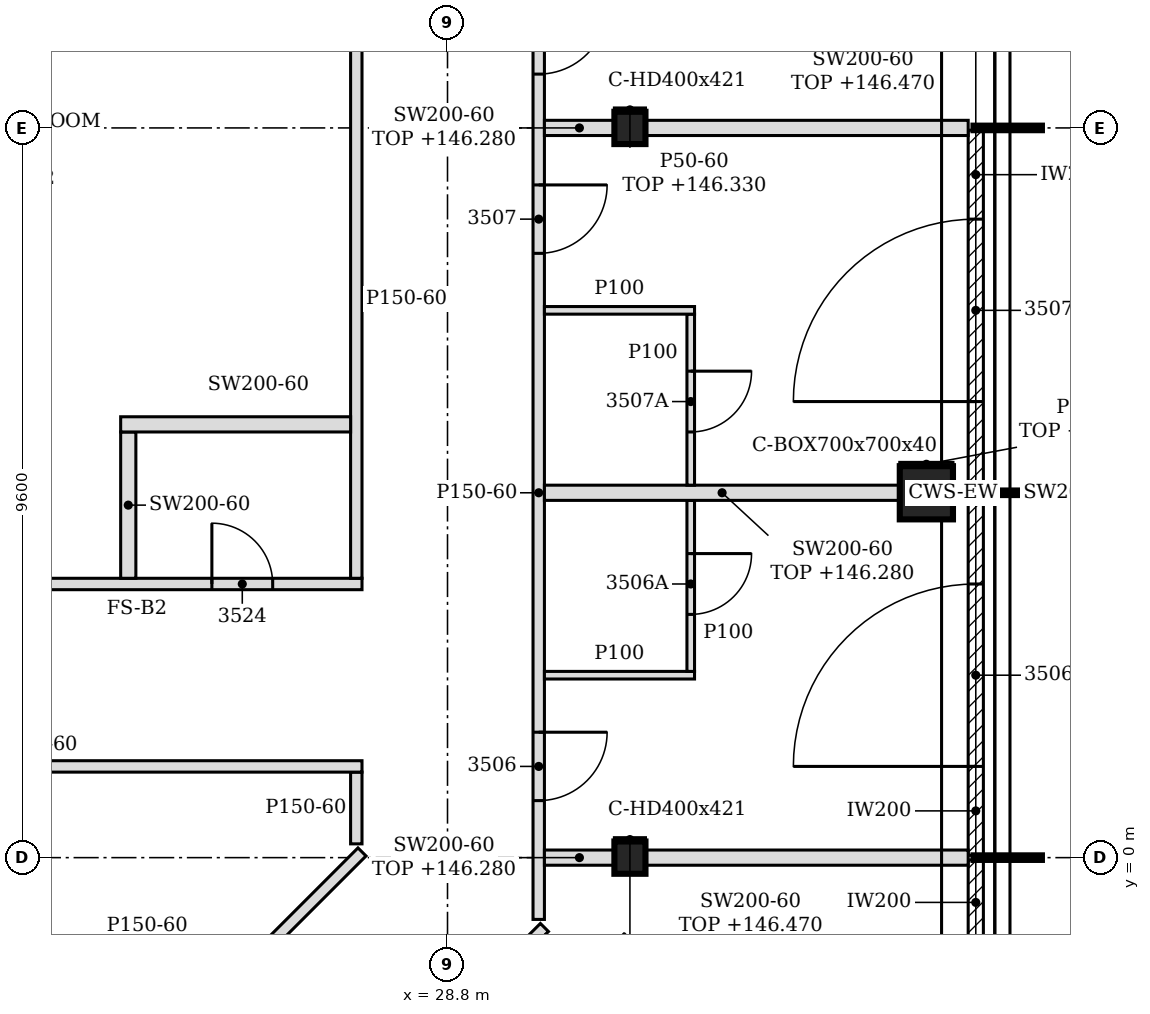
"""IFC4 building model, lengths in metres.
Left out: names, types, materials, properties, quantities, classifications, styles, units other than length and angle.
Written with IfcOpenShell. Run it as: python <this file> out.ifc"""

import sys

from ifc_helpers import new_model, si_unit, direction, frame, frame_2d, origin, origin_2d, place, context, subcontext, project, spatial, polyline, rectangle, hollow_rectangle, i_section, outline, extrude, element, fill, save


model = new_model("IFC4")
c1 = context("Model", 3, precision=1e-05, world=origin(), true_north=direction((0.0, 1.0)))
c2 = subcontext(c1, "Body", "Model", "MODEL_VIEW")
j1 = project(units=[si_unit("LENGTHUNIT", "METRE"), si_unit("PLANEANGLEUNIT", "RADIAN")], contexts=[c1])
p1 = place(None, origin())
s1 = spatial("IfcSite", under=j1, at=p1, CompositionType="ELEMENT")
p2 = place(p1, origin())
s2 = spatial("IfcBuilding", under=s1, at=p2, CompositionType="ELEMENT")
p3 = place(p2, frame((0.0, 0.0, 143.4)))
s3 = spatial("IfcBuildingStorey", under=s2, at=p3, CompositionType="ELEMENT", Elevation=143.4)
p4 = place(p3, frame((35.1, 4.8, -0.15), z_axis=(0.0, 0.0, 1.0), x_axis=(1.0, 0.0, 0.0)))
e1 = element("IfcColumn", 1, at=p4, inside=s3, PredefinedType="COLUMN", context=c2, shape_type="SweptSolid", body=[
    extrude(hollow_rectangle(XDim=0.7, YDim=0.7, WallThickness=0.04, at=origin_2d()), origin(), (0.0, 0.0, 1.0), 3.6),
])
for number, where, z_axis, x_axis in (
    (2, (31.2, 0.0, -0.15), (0.0, 0.0, 1.0), (1.0, 0.0, 0.0)),
    (3, (31.2, 9.6, -0.15), (0.0, 0.0, 1.0), (1.0, 0.0, 0.0)),
):
    element("IfcColumn", number, at=place(p3, frame(where, z_axis=z_axis, x_axis=x_axis)), inside=s3, PredefinedType="COLUMN", context=c2, shape_type="SweptSolid", body=[
        extrude(i_section(OverallWidth=0.409, OverallDepth=0.425, WebThickness=0.033, FlangeThickness=0.052, FilletRadius=0.015, at=origin_2d()), origin(), (0.0, 0.0, 1.0), 3.6),
    ])
p5 = place(p3, frame((35.75, -4.656, 0.0), z_axis=(0.0, 0.0, 1.0), x_axis=(0.0, 1.0, 0.0)))
e4 = element("IfcWall", 4, at=p5, inside=s3, PredefinedType="NOTDEFINED", context=c2, shape_type="SweptSolid", body=[
    extrude(rectangle(XDim=4.626, YDim=0.2, at=frame_2d((2.313, 0.0))), origin(), (0.0, 0.0, 1.0), 3.45),
])
p6 = place(p5, frame((1.108, 0.0, 0.0)))
e5 = element("IfcOpeningElement", 5, at=p6, cuts=e4, PredefinedType="OPENING", context=c2, shape_type="SweptSolid", body=[
    extrude(rectangle(XDim=2.4, YDim=2.4, at=frame_2d((1.2, 1.2))), frame((0.0, 0.11, 0.0), z_axis=(0.0, -1.0, 0.0), x_axis=(1.0, 0.0, 0.0)), (0.0, 0.0, 1.0), 0.22),
])
p7 = place(p3, frame((35.75, 0.03, 0.0), z_axis=(0.0, 0.0, 1.0), x_axis=(0.0, 1.0, 0.0)))
e6 = element("IfcWall", 6, at=p7, inside=s3, PredefinedType="NOTDEFINED", context=c2, shape_type="SweptSolid", body=[
    extrude(rectangle(XDim=4.74, YDim=0.2, at=frame_2d((2.37, 0.0))), origin(), (0.0, 0.0, 1.0), 3.45),
])
p8 = place(p7, frame((1.17, 0.0, 0.0)))
e7 = element("IfcOpeningElement", 7, at=p8, cuts=e6, PredefinedType="OPENING", context=c2, shape_type="SweptSolid", body=[
    extrude(rectangle(XDim=2.4, YDim=2.4, at=frame_2d((1.2, 1.2))), frame((0.0, 0.11, 0.0), z_axis=(0.0, -1.0, 0.0), x_axis=(1.0, 0.0, 0.0)), (0.0, 0.0, 1.0), 0.22),
])
p9 = place(p3, frame((35.75, 4.83, 0.0), z_axis=(0.0, 0.0, 1.0), x_axis=(0.0, 1.0, 0.0)))
e8 = element("IfcWall", 8, at=p9, inside=s3, PredefinedType="NOTDEFINED", context=c2, shape_type="SweptSolid", body=[
    extrude(rectangle(XDim=4.74, YDim=0.2, at=frame_2d((2.37, 0.0))), origin(), (0.0, 0.0, 1.0), 3.45),
])
p10 = place(p9, frame((1.17, 0.0, 0.0)))
e9 = element("IfcOpeningElement", 9, at=p10, cuts=e8, PredefinedType="OPENING", context=c2, shape_type="SweptSolid", body=[
    extrude(rectangle(XDim=2.4, YDim=2.4, at=frame_2d((1.2, 1.2))), frame((0.0, 0.11, 0.0), z_axis=(0.0, -1.0, 0.0), x_axis=(1.0, 0.0, 0.0)), (0.0, 0.0, 1.0), 0.22),
])
p11 = place(p3, frame((22.722, -8.272, 0.0), z_axis=(0.0, 0.0, 1.0), x_axis=(0.707106781187, 0.707106781187, 0.0)))
e10 = element("IfcWall", 10, at=p11, inside=s3, PredefinedType="PARTITIONING", context=c2, shape_type="SweptSolid", body=[
    extrude(rectangle(XDim=10.399, YDim=0.15, at=frame_2d((5.199, 0.0))), origin(), (0.0, 0.0, 1.0), 2.88),
])
p12 = place(p11, frame((1.925, 0.0, 0.0)))
e11 = element("IfcOpeningElement", 11, at=p12, cuts=e10, PredefinedType="OPENING", context=c2, shape_type="SweptSolid", body=[
    extrude(rectangle(XDim=0.9, YDim=2.1, at=frame_2d((0.45, 1.05))), frame((0.0, 0.085, 0.0), z_axis=(0.0, -1.0, 0.0), x_axis=(1.0, 0.0, 0.0)), (0.0, 0.0, 1.0), 0.17),
])
p13 = place(p11, frame((5.963, 0.0, 0.0)))
e12 = element("IfcOpeningElement", 12, at=p13, cuts=e10, PredefinedType="OPENING", context=c2, shape_type="SweptSolid", body=[
    extrude(rectangle(XDim=0.9, YDim=2.1, at=frame_2d((0.45, 1.05))), frame((0.0, 0.085, 0.0), z_axis=(0.0, -1.0, 0.0), x_axis=(1.0, 0.0, 0.0)), (0.0, 0.0, 1.0), 0.17),
])
p14 = place(p3, frame((19.408, -8.191, 0.0), z_axis=(0.0, 0.0, 1.0), x_axis=(0.707117222888, 0.707096339331, 0.0)))
e13 = element("IfcWall", 13, at=p14, inside=s3, PredefinedType="PARTITIONING", context=c2, shape_type="SweptSolid", body=[
    extrude(rectangle(XDim=11.691, YDim=0.15, at=frame_2d((5.845, 0.0))), origin(), (0.0, 0.0, 1.0), 2.88),
])
p15 = place(p14, frame((5.195, 0.0, 0.0)))
e14 = element("IfcOpeningElement", 14, at=p15, cuts=e13, PredefinedType="OPENING", context=c2, shape_type="SweptSolid", body=[
    extrude(rectangle(XDim=0.9, YDim=2.1, at=frame_2d((0.45, 1.05))), frame((0.0, 0.085, 0.0), z_axis=(0.0, -1.0, 0.0), x_axis=(1.0, 0.0, 0.0)), (0.0, 0.0, 1.0), 0.17),
])
p16 = place(p3, frame((30.0, -0.813, 0.0), z_axis=(0.0, 0.0, 1.0), x_axis=(0.0, 1.0, 0.0)))
e15 = element("IfcWall", 15, at=p16, inside=s3, PredefinedType="PARTITIONING", context=c2, shape_type="SweptSolid", body=[
    extrude(outline(polyline([(0.0, 0.0), (12.834, 0.0), (12.834, 3.45), (10.518, 3.45), (10.516, 2.88), (10.308, 2.88), (10.306, 3.45), (5.718, 3.45), (5.716, 2.88), (5.508, 2.88), (5.506, 3.45), (0.918, 3.45), (0.916, 2.88), (0.708, 2.88), (0.706, 3.45), (0.0, 3.45), (0.0, 0.0)])), frame((0.0, 0.075, 0.0), z_axis=(0.0, -1.0, 0.0), x_axis=(1.0, 0.0, 0.0)), (0.0, 0.0, 1.0), 0.15),
])
p17 = place(p16, frame((1.563, 0.0, 0.0)))
e16 = element("IfcOpeningElement", 16, at=p17, cuts=e15, PredefinedType="OPENING", context=c2, shape_type="SweptSolid", body=[
    extrude(rectangle(XDim=0.9, YDim=2.1, at=frame_2d((0.45, 1.05))), frame((0.0, 0.085, 0.0), z_axis=(0.0, -1.0, 0.0), x_axis=(1.0, 0.0, 0.0)), (0.0, 0.0, 1.0), 0.17),
])
p18 = place(p16, frame((8.763, 0.0, 0.0)))
e17 = element("IfcOpeningElement", 17, at=p18, cuts=e15, PredefinedType="OPENING", context=c2, shape_type="SweptSolid", body=[
    extrude(rectangle(XDim=0.9, YDim=2.1, at=frame_2d((0.45, 1.05))), frame((0.0, 0.085, 0.0), z_axis=(0.0, -1.0, 0.0), x_axis=(1.0, 0.0, 0.0)), (0.0, 0.0, 1.0), 0.17),
])
p19 = place(p16, frame((11.121, 0.0, 0.0)))
e18 = element("IfcOpeningElement", 18, at=p19, cuts=e15, PredefinedType="OPENING", context=c2, shape_type="SweptSolid", body=[
    extrude(rectangle(XDim=0.9, YDim=2.1, at=frame_2d((0.45, 1.05))), frame((0.0, 0.085, 0.0), z_axis=(0.0, -1.0, 0.0), x_axis=(1.0, 0.0, 0.0)), (0.0, 0.0, 1.0), 0.17),
])
p20 = place(p3, frame((30.075, 0.0, 0.0), z_axis=(0.0, 0.0, 1.0), x_axis=(1.0, 0.0, 0.0)))
e19 = element("IfcWall", 19, at=p20, inside=s3, PredefinedType="PARTITIONING", context=c2, shape_type="SweptSolid", body=[
    extrude(rectangle(XDim=0.921, YDim=0.2, at=frame_2d((0.46, 0.0))), origin(), (0.0, 0.0, 1.0), 2.88),
])
p21 = place(p3, frame((31.405, 0.0, 0.0), z_axis=(0.0, 0.0, 1.0), x_axis=(1.0, 0.0, 0.0)))
e20 = element("IfcWall", 20, at=p21, inside=s3, PredefinedType="PARTITIONING", context=c2, shape_type="SweptSolid", body=[
    extrude(outline(polyline([(0.0, 0.0), (4.245, 0.0), (4.246, 3.07), (3.845, 3.07), (3.844, 2.93), (3.545, 2.93), (3.543, 3.07), (0.0, 3.07), (0.0, 0.0)])), frame((0.0, 0.1, 0.0), z_axis=(0.0, -1.0, 0.0), x_axis=(1.0, 0.0, 0.0)), (0.0, 0.0, 1.0), 0.2),
])
p22 = place(p3, frame((27.6, 0.181, 0.0), z_axis=(0.0, 0.0, 1.0), x_axis=(0.0, 1.0, 0.0)))
e21 = element("IfcWall", 21, at=p22, inside=s3, PredefinedType="PARTITIONING", context=c2, shape_type="SweptSolid", body=[
    extrude(rectangle(XDim=0.944, YDim=0.15, at=frame_2d((0.472, 0.0))), origin(), (0.0, 0.0, 1.0), 3.45),
])
p23 = place(p3, frame((19.125, 1.2, 0.0), z_axis=(0.0, 0.0, 1.0), x_axis=(1.0, 0.0, 0.0)))
e22 = element("IfcWall", 22, at=p23, inside=s3, PredefinedType="PARTITIONING", context=c2, shape_type="SweptSolid", body=[
    extrude(outline(polyline([(0.0, 0.0), (8.55, 0.0), (8.55, 3.45), (0.225, 3.45), (0.223, 2.83), (0.0, 2.83), (0.0, 0.0)])), frame((0.0, 0.075, 0.0), z_axis=(0.0, -1.0, 0.0), x_axis=(1.0, 0.0, 0.0)), (0.0, 0.0, 1.0), 0.15),
])
p24 = place(p3, frame((30.075, 2.4, 0.0), z_axis=(0.0, 0.0, 1.0), x_axis=(1.0, 0.0, 0.0)))
e23 = element("IfcWall", 23, at=p24, inside=s3, PredefinedType="PARTITIONING", context=c2, shape_type="SweptSolid", body=[
    extrude(outline(polyline([(0.0, 0.0), (1.975, 0.0), (1.975, 3.45), (1.275, 3.45), (1.273, 2.93), (0.975, 2.93), (0.973, 3.45), (0.0, 3.45), (0.0, 0.0)])), frame((0.0, 0.05, 0.0), z_axis=(0.0, -1.0, 0.0), x_axis=(1.0, 0.0, 0.0)), (0.0, 0.0, 1.0), 0.1),
])
p25 = place(p3, frame((32.0, 2.45, 0.0), z_axis=(0.0, 0.0, 1.0), x_axis=(0.0, 1.0, 0.0)))
e24 = element("IfcWall", 24, at=p25, inside=s3, PredefinedType="PARTITIONING", context=c2, shape_type="SweptSolid", body=[
    extrude(rectangle(XDim=2.25, YDim=0.1, at=frame_2d((1.125, 0.0))), origin(), (0.0, 0.0, 1.0), 3.45),
])
p26 = place(p25, frame((0.75, 0.0, 0.0)))
e25 = element("IfcOpeningElement", 25, at=p26, cuts=e24, PredefinedType="OPENING", context=c2, shape_type="SweptSolid", body=[
    extrude(rectangle(XDim=0.8, YDim=2.1, at=frame_2d((0.4, 1.05))), frame((0.0, 0.06, 0.0), z_axis=(0.0, -1.0, 0.0), x_axis=(1.0, 0.0, 0.0)), (0.0, 0.0, 1.0), 0.12),
])
p27 = place(p3, frame((19.125, 3.6, 0.0), z_axis=(0.0, 0.0, 1.0), x_axis=(1.0, 0.0, 0.0)))
e26 = element("IfcWall", 26, at=p27, inside=s3, PredefinedType="PARTITIONING", context=c2, shape_type="SweptSolid", body=[
    extrude(outline(polyline([(0.0, 0.0), (8.55, 0.0), (8.55, 3.45), (0.225, 3.45), (0.223, 2.83), (0.0, 2.83), (0.0, 0.0)])), frame((0.0, 0.075, 0.0), z_axis=(0.0, -1.0, 0.0), x_axis=(1.0, 0.0, 0.0)), (0.0, 0.0, 1.0), 0.15),
])
p28 = place(p27, frame((6.575, 0.0, 0.0)))
e27 = element("IfcOpeningElement", 27, at=p28, cuts=e26, PredefinedType="OPENING", context=c2, shape_type="SweptSolid", body=[
    extrude(rectangle(XDim=0.8, YDim=2.1, at=frame_2d((0.4, 1.05))), frame((0.0, 0.085, 0.0), z_axis=(0.0, -1.0, 0.0), x_axis=(1.0, 0.0, 0.0)), (0.0, 0.0, 1.0), 0.17),
])
p29 = place(p3, frame((24.6, 3.675, 0.0), z_axis=(0.0, 0.0, 1.0), x_axis=(0.0, 1.0, 0.0)))
e28 = element("IfcWall", 28, at=p29, inside=s3, PredefinedType="PARTITIONING", context=c2, shape_type="SweptSolid", body=[
    extrude(outline(polyline([(0.0, 0.0), (1.925, 0.0), (1.925, 3.45), (1.23, 3.45), (1.228, 2.88), (1.02, 2.88), (1.018, 3.45), (0.0, 3.45), (0.0, 0.0)])), frame((0.0, 0.1, 0.0), z_axis=(0.0, -1.0, 0.0), x_axis=(1.0, 0.0, 0.0)), (0.0, 0.0, 1.0), 0.2),
])
p30 = place(p3, frame((27.6, 3.675, 0.0), z_axis=(0.0, 0.0, 1.0), x_axis=(0.0, 1.0, 0.0)))
e29 = element("IfcWall", 29, at=p30, inside=s3, PredefinedType="PARTITIONING", context=c2, shape_type="SweptSolid", body=[
    extrude(outline(polyline([(0.0, 0.0), (7.352, 0.0), (7.352, 3.45), (6.03, 3.45), (6.028, 2.88), (5.82, 2.88), (5.818, 3.45), (1.23, 3.45), (1.228, 2.88), (1.02, 2.88), (1.018, 3.45), (0.0, 3.45), (0.0, 0.0)])), frame((0.0, 0.075, 0.0), z_axis=(0.0, -1.0, 0.0), x_axis=(1.0, 0.0, 0.0)), (0.0, 0.0, 1.0), 0.15),
])
p31 = place(p3, frame((30.075, 4.8, 0.0), z_axis=(0.0, 0.0, 1.0), x_axis=(1.0, 0.0, 0.0)))
e30 = element("IfcWall", 30, at=p31, inside=s3, PredefinedType="PARTITIONING", context=c2, shape_type="SweptSolid", body=[
    extrude(rectangle(XDim=4.675, YDim=0.2, at=frame_2d((2.337, 0.0))), origin(), (0.0, 0.0, 1.0), 2.88),
])
p32 = place(p3, frame((35.45, 4.8, 0.0), z_axis=(0.0, 0.0, 1.0), x_axis=(1.0, 0.0, 0.0)))
e31 = element("IfcWall", 31, at=p32, inside=s3, PredefinedType="PARTITIONING", context=c2, shape_type="SweptSolid", body=[
    extrude(rectangle(XDim=0.2, YDim=0.2, at=frame_2d((0.1, 0.0))), origin(), (0.0, 0.0, 1.0), 3.45),
])
p33 = place(p3, frame((32.0, 4.9, 0.0), z_axis=(0.0, 0.0, 1.0), x_axis=(0.0, 1.0, 0.0)))
e32 = element("IfcWall", 32, at=p33, inside=s3, PredefinedType="PARTITIONING", context=c2, shape_type="SweptSolid", body=[
    extrude(rectangle(XDim=2.25, YDim=0.1, at=frame_2d((1.125, 0.0))), origin(), (0.0, 0.0, 1.0), 3.45),
])
p34 = place(p33, frame((0.7, 0.0, 0.0)))
e33 = element("IfcOpeningElement", 33, at=p34, cuts=e32, PredefinedType="OPENING", context=c2, shape_type="SweptSolid", body=[
    extrude(rectangle(XDim=0.8, YDim=2.1, at=frame_2d((0.4, 1.05))), frame((0.0, 0.06, 0.0), z_axis=(0.0, -1.0, 0.0), x_axis=(1.0, 0.0, 0.0)), (0.0, 0.0, 1.0), 0.12),
])
p35 = place(p3, frame((24.5, 5.7, 0.0), z_axis=(0.0, 0.0, 1.0), x_axis=(1.0, 0.0, 0.0)))
e34 = element("IfcWall", 34, at=p35, inside=s3, PredefinedType="PARTITIONING", context=c2, shape_type="SweptSolid", body=[
    extrude(rectangle(XDim=3.025, YDim=0.2, at=frame_2d((1.512, 0.0))), origin(), (0.0, 0.0, 1.0), 3.45),
])
p36 = place(p3, frame((30.075, 7.2, 0.0), z_axis=(0.0, 0.0, 1.0), x_axis=(1.0, 0.0, 0.0)))
e35 = element("IfcWall", 35, at=p36, inside=s3, PredefinedType="PARTITIONING", context=c2, shape_type="SweptSolid", body=[
    extrude(outline(polyline([(0.0, 0.0), (1.975, 0.0), (1.975, 3.45), (1.275, 3.45), (1.273, 2.93), (0.975, 2.93), (0.973, 3.45), (0.0, 3.45), (0.0, 0.0)])), frame((0.0, 0.05, 0.0), z_axis=(0.0, -1.0, 0.0), x_axis=(1.0, 0.0, 0.0)), (0.0, 0.0, 1.0), 0.1),
])
p37 = place(p3, frame((30.075, 9.6, 0.0), z_axis=(0.0, 0.0, 1.0), x_axis=(1.0, 0.0, 0.0)))
e36 = element("IfcWall", 36, at=p37, inside=s3, PredefinedType="PARTITIONING", context=c2, shape_type="SweptSolid", body=[
    extrude(rectangle(XDim=0.921, YDim=0.2, at=frame_2d((0.46, 0.0))), origin(), (0.0, 0.0, 1.0), 2.88),
])
p38 = place(p3, frame((31.405, 9.6, 0.0), z_axis=(0.0, 0.0, 1.0), x_axis=(1.0, 0.0, 0.0)))
e37 = element("IfcWall", 37, at=p38, inside=s3, PredefinedType="PARTITIONING", context=c2, shape_type="SweptSolid", body=[
    extrude(outline(polyline([(0.0, 0.0), (4.245, 0.0), (4.246, 3.07), (3.845, 3.07), (3.844, 2.93), (3.545, 2.93), (3.543, 3.07), (0.0, 3.07), (0.0, 0.0)])), frame((0.0, 0.1, 0.0), z_axis=(0.0, -1.0, 0.0), x_axis=(1.0, 0.0, 0.0)), (0.0, 0.0, 1.0), 0.2),
])
p39 = place(p3, frame((30.996, 0.238, 0.0), z_axis=(0.0, 0.0, 1.0), x_axis=(1.0, 0.0, 0.0)))
e38 = element("IfcWall", 38, at=p39, inside=s3, PredefinedType="PARTITIONING", context=c2, shape_type="SweptSolid", body=[
    extrude(rectangle(XDim=0.409, YDim=0.05, at=frame_2d((0.205, 0.0))), origin(), (0.0, 0.0, 1.0), 2.93),
])
p40 = place(p3, frame((34.75, 5.175, 0.0), z_axis=(0.0, 0.0, 1.0), x_axis=(1.0, 0.0, 0.0)))
e39 = element("IfcWall", 39, at=p40, inside=s3, PredefinedType="PARTITIONING", context=c2, shape_type="SweptSolid", body=[
    extrude(rectangle(XDim=0.7, YDim=0.05, at=frame_2d((0.35, 0.0))), origin(), (0.0, 0.0, 1.0), 2.93),
])
p41 = place(p3, frame((30.996, 9.837, 0.0), z_axis=(0.0, 0.0, 1.0), x_axis=(1.0, 0.0, 0.0)))
e40 = element("IfcWall", 40, at=p41, inside=s3, PredefinedType="PARTITIONING", context=c2, shape_type="SweptSolid", body=[
    extrude(rectangle(XDim=0.409, YDim=0.05, at=frame_2d((0.205, 0.0))), origin(), (0.0, 0.0, 1.0), 2.93),
])
p42 = place(p8, origin())
e41 = element("IfcDoor", 41, at=p42, inside=s3, OperationType="SINGLE_SWING_LEFT", PredefinedType="DOOR", context=c2, shape_type="SweptSolid", body=[
    extrude(rectangle(XDim=2.4, YDim=2.4, at=frame_2d((1.2, 1.2))), frame((0.0, 0.025, 0.0), z_axis=(0.0, -1.0, 0.0), x_axis=(1.0, 0.0, 0.0)), (0.0, 0.0, 1.0), 0.05),
])
fill(e7, e41)
p43 = place(p10, origin())
e42 = element("IfcDoor", 42, at=p43, inside=s3, OperationType="SINGLE_SWING_LEFT", PredefinedType="DOOR", context=c2, shape_type="SweptSolid", body=[
    extrude(rectangle(XDim=2.4, YDim=2.4, at=frame_2d((1.2, 1.2))), frame((0.0, 0.025, 0.0), z_axis=(0.0, -1.0, 0.0), x_axis=(1.0, 0.0, 0.0)), (0.0, 0.0, 1.0), 0.05),
])
fill(e9, e42)
p44 = place(p17, frame((0.9, 0.0, 0.0), z_axis=(0.0, 0.0, 1.0), x_axis=(-1.0, 0.0, 0.0)))
e43 = element("IfcDoor", 43, at=p44, inside=s3, OperationType="SINGLE_SWING_LEFT", PredefinedType="DOOR", context=c2, shape_type="SweptSolid", body=[
    extrude(rectangle(XDim=0.9, YDim=2.1, at=frame_2d((0.45, 1.05))), frame((0.0, 0.025, 0.0), z_axis=(0.0, -1.0, 0.0), x_axis=(1.0, 0.0, 0.0)), (0.0, 0.0, 1.0), 0.05),
])
fill(e16, e43)
p45 = place(p26, frame((0.8, 0.0, 0.0), z_axis=(0.0, 0.0, 1.0), x_axis=(-1.0, 0.0, 0.0)))
e44 = element("IfcDoor", 44, at=p45, inside=s3, OperationType="SINGLE_SWING_LEFT", PredefinedType="DOOR", context=c2, shape_type="SweptSolid", body=[
    extrude(rectangle(XDim=0.8, YDim=2.1, at=frame_2d((0.4, 1.05))), frame((0.0, 0.025, 0.0), z_axis=(0.0, -1.0, 0.0), x_axis=(1.0, 0.0, 0.0)), (0.0, 0.0, 1.0), 0.05),
])
fill(e25, e44)
p46 = place(p18, frame((0.9, 0.0, 0.0), z_axis=(0.0, 0.0, 1.0), x_axis=(-1.0, 0.0, 0.0)))
e45 = element("IfcDoor", 45, at=p46, inside=s3, OperationType="SINGLE_SWING_LEFT", PredefinedType="DOOR", context=c2, shape_type="SweptSolid", body=[
    extrude(rectangle(XDim=0.9, YDim=2.1, at=frame_2d((0.45, 1.05))), frame((0.0, 0.025, 0.0), z_axis=(0.0, -1.0, 0.0), x_axis=(1.0, 0.0, 0.0)), (0.0, 0.0, 1.0), 0.05),
])
fill(e17, e45)
p47 = place(p34, frame((0.8, 0.0, 0.0), z_axis=(0.0, 0.0, 1.0), x_axis=(-1.0, 0.0, 0.0)))
e46 = element("IfcDoor", 46, at=p47, inside=s3, OperationType="SINGLE_SWING_LEFT", PredefinedType="DOOR", context=c2, shape_type="SweptSolid", body=[
    extrude(rectangle(XDim=0.8, YDim=2.1, at=frame_2d((0.4, 1.05))), frame((0.0, 0.025, 0.0), z_axis=(0.0, -1.0, 0.0), x_axis=(1.0, 0.0, 0.0)), (0.0, 0.0, 1.0), 0.05),
])
fill(e33, e46)
p48 = place(p19, frame((0.9, 0.0, 0.0), z_axis=(0.0, 0.0, 1.0), x_axis=(-1.0, 0.0, 0.0)))
e47 = element("IfcDoor", 47, at=p48, inside=s3, OperationType="SINGLE_SWING_LEFT", PredefinedType="DOOR", context=c2, shape_type="SweptSolid", body=[
    extrude(rectangle(XDim=0.9, YDim=2.1, at=frame_2d((0.45, 1.05))), frame((0.0, 0.025, 0.0), z_axis=(0.0, -1.0, 0.0), x_axis=(1.0, 0.0, 0.0)), (0.0, 0.0, 1.0), 0.05),
])
fill(e18, e47)
p49 = place(p28, origin())
e48 = element("IfcDoor", 48, at=p49, inside=s3, OperationType="SINGLE_SWING_LEFT", PredefinedType="DOOR", context=c2, shape_type="SweptSolid", body=[
    extrude(rectangle(XDim=0.8, YDim=2.1, at=frame_2d((0.4, 1.05))), frame((0.0, 0.025, 0.0), z_axis=(0.0, -1.0, 0.0), x_axis=(1.0, 0.0, 0.0)), (0.0, 0.0, 1.0), 0.05),
])
fill(e27, e48)
save(model, sys.argv[1])
